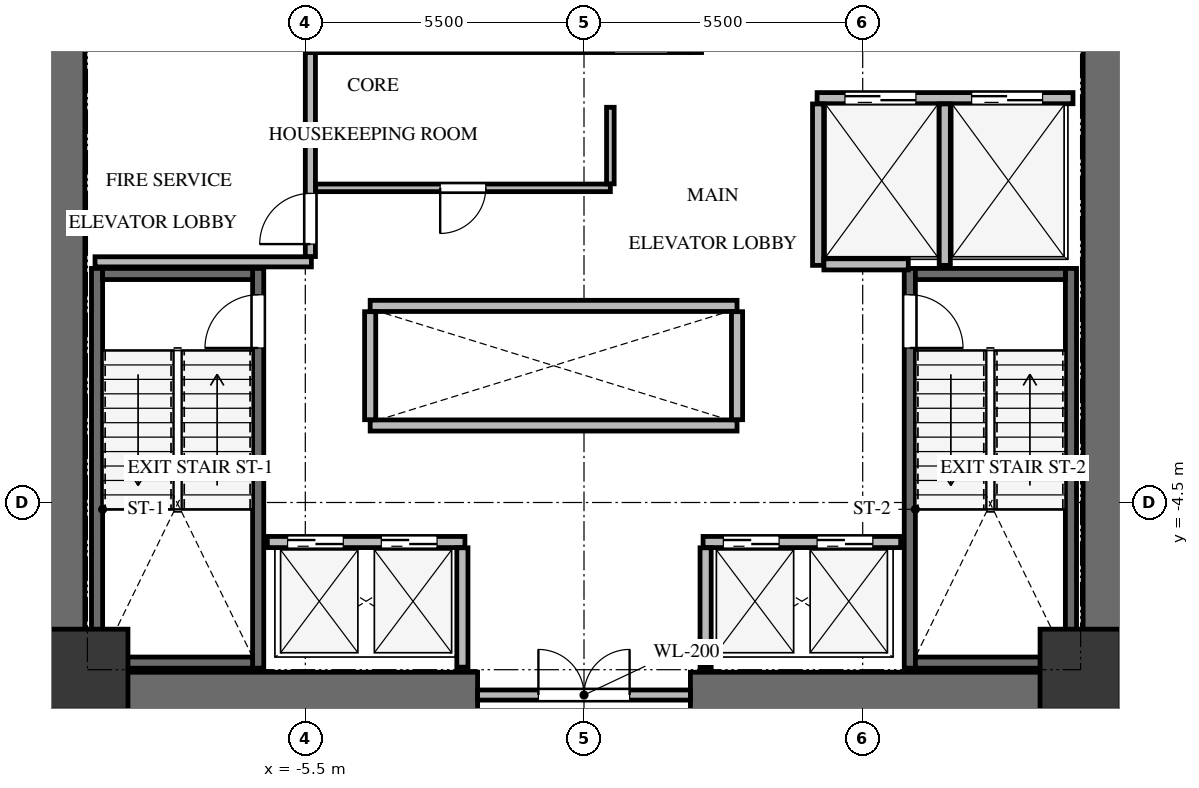
"""IFC4 building model, lengths in metres.
Left out: names, types, materials, properties, quantities, classifications, styles, units other than length and angle.
Written with IfcOpenShell. Run it as: python <this file> out.ifc"""

import sys

from ifc_helpers import new_model, si_unit, direction, frame, frame_2d, origin, origin_2d, place, context, subcontext, project, spatial, rectangle, extrude, source, transform, mapped, element, fill, save


model = new_model("IFC4")
c1 = context("Model", 3, precision=1e-05, world=origin(), true_north=direction((0.0, 1.0)))
c2 = subcontext(c1, "Body", "Model", "MODEL_VIEW")
j1 = project(units=[si_unit("LENGTHUNIT", "METRE"), si_unit("PLANEANGLEUNIT", "RADIAN")], contexts=[c1])
p1 = place(None, origin())
s1 = spatial("IfcSite", under=j1, at=p1, CompositionType="ELEMENT")
p2 = place(p1, origin())
s2 = spatial("IfcBuilding", under=s1, at=p2, CompositionType="ELEMENT")
p3 = place(p2, frame((0.0, 0.0, 84.3)))
s3 = spatial("IfcBuildingStorey", under=s2, at=p3, CompositionType="ELEMENT", Elevation=84.3)
for number, where, z_axis, x_axis in (
    (1, (-10.3, -8.75, 0.0), (0.0, 0.0, 1.0), (0.0, 1.0, 0.0)),
    (2, (10.3, -8.75, 0.0), (0.0, 0.0, 1.0), (0.0, 1.0, 0.0)),
):
    element("IfcWall", number, at=place(p3, frame(where, z_axis=z_axis, x_axis=x_axis)), inside=s3, PredefinedType="SHEAR", context=c2, shape_type="SweptSolid", body=[
        extrude(rectangle(XDim=17.5, YDim=0.9, at=frame_2d((8.75, 0.0))), origin(), (0.0, 0.0, 1.0), 4.2),
    ])
for number, where, z_axis, x_axis in (
    (3, (-9.85, -8.3, 0.0), (0.0, 0.0, 1.0), (1.0, 0.0, 0.0)),
    (4, (2.1, -8.3, 0.0), (0.0, 0.0, 1.0), (1.0, 0.0, 0.0)),
):
    element("IfcWall", number, at=place(p3, frame(where, z_axis=z_axis, x_axis=x_axis)), inside=s3, PredefinedType="SHEAR", context=c2, shape_type="SweptSolid", body=[
        extrude(rectangle(XDim=7.75, YDim=0.9, at=frame_2d((3.875, 0.0))), origin(), (0.0, 0.0, 1.0), 4.2),
    ])
p4 = place(p3, frame((-6.43, -7.77, -0.24), z_axis=(0.0, 0.0, 1.0), x_axis=(0.0, 1.0, 0.0)))
e5 = element("IfcWall", 5, at=p4, inside=s3, PredefinedType="SHEAR", context=c2, shape_type="SweptSolid", body=[
    extrude(rectangle(XDim=7.89, YDim=0.22, at=frame_2d((3.945, 0.0))), origin(), (0.0, 0.0, 1.0), 4.14),
])
p5 = place(p4, frame((6.32, 0.0, 0.0)))
e6 = element("IfcOpeningElement", 6, at=p5, cuts=e5, PredefinedType="OPENING", context=c2, shape_type="SweptSolid", body=[
    extrude(rectangle(XDim=1.05, YDim=2.15, at=frame_2d((0.525, 1.075))), frame((0.0, 0.12, 0.0), z_axis=(0.0, -1.0, 0.0), x_axis=(1.0, 0.0, 0.0)), (0.0, 0.0, 1.0), 0.24),
])
p6 = place(p3, frame((-9.61, 0.12, -0.24), z_axis=(0.0, 0.0, 1.0), x_axis=(0.0, -1.0, 0.0)))
e7 = element("IfcWall", 7, at=p6, inside=s3, PredefinedType="SHEAR", context=c2, shape_type="SweptSolid", body=[
    extrude(rectangle(XDim=7.89, YDim=0.22, at=frame_2d((3.945, 0.0))), origin(), (0.0, 0.0, 1.0), 4.14),
])
for number, where, z_axis, x_axis in (
    (8, (-9.5, -7.66, -0.24), (0.0, 0.0, 1.0), (1.0, 0.0, 0.0)),
    (9, (-6.54, 0.01, -0.24), (0.0, 0.0, 1.0), (-1.0, 0.0, 0.0)),
):
    element("IfcWall", number, at=place(p3, frame(where, z_axis=z_axis, x_axis=x_axis)), inside=s3, PredefinedType="SHEAR", context=c2, shape_type="SweptSolid", body=[
        extrude(rectangle(XDim=2.96, YDim=0.22, at=frame_2d((1.48, 0.0))), origin(), (0.0, 0.0, 1.0), 4.14),
    ])
p7 = place(p3, frame((9.61, -7.77, -0.24), z_axis=(0.0, 0.0, 1.0), x_axis=(0.0, 1.0, 0.0)))
e10 = element("IfcWall", 10, at=p7, inside=s3, PredefinedType="SHEAR", context=c2, shape_type="SweptSolid", body=[
    extrude(rectangle(XDim=7.89, YDim=0.22, at=frame_2d((3.945, 0.0))), origin(), (0.0, 0.0, 1.0), 4.14),
])
p8 = place(p3, frame((6.43, 0.12, -0.24), z_axis=(0.0, 0.0, 1.0), x_axis=(0.0, -1.0, 0.0)))
e11 = element("IfcWall", 11, at=p8, inside=s3, PredefinedType="SHEAR", context=c2, shape_type="SweptSolid", body=[
    extrude(rectangle(XDim=7.89, YDim=0.22, at=frame_2d((3.945, 0.0))), origin(), (0.0, 0.0, 1.0), 4.14),
])
p9 = place(p8, frame((0.52, 0.0, 0.0)))
e12 = element("IfcOpeningElement", 12, at=p9, cuts=e11, PredefinedType="OPENING", context=c2, shape_type="SweptSolid", body=[
    extrude(rectangle(XDim=1.05, YDim=2.15, at=frame_2d((0.525, 1.075))), frame((0.0, 0.12, 0.0), z_axis=(0.0, -1.0, 0.0), x_axis=(1.0, 0.0, 0.0)), (0.0, 0.0, 1.0), 0.24),
])
for number, where, z_axis, x_axis in (
    (13, (6.54, -7.66, -0.24), (0.0, 0.0, 1.0), (1.0, 0.0, 0.0)),
    (14, (9.5, 0.01, -0.24), (0.0, 0.0, 1.0), (-1.0, 0.0, 0.0)),
):
    element("IfcWall", number, at=place(p3, frame(where, z_axis=z_axis, x_axis=x_axis)), inside=s3, PredefinedType="SHEAR", context=c2, shape_type="SweptSolid", body=[
        extrude(rectangle(XDim=2.96, YDim=0.22, at=frame_2d((1.48, 0.0))), origin(), (0.0, 0.0, 1.0), 4.14),
    ])
for number, where, z_axis, x_axis in (
    (15, (2.21, 4.38, -0.24), (0.0, 0.0, 1.0), (0.0, 1.0, 0.0)),
    (16, (-5.36, 7.78, -0.24), (0.0, 0.0, 1.0), (0.0, -1.0, 0.0)),
):
    element("IfcWall", number, at=place(p3, frame(where, z_axis=z_axis, x_axis=x_axis)), inside=s3, PredefinedType="SHEAR", context=c2, shape_type="SweptSolid", body=[
        extrude(rectangle(XDim=3.4, YDim=0.22, at=frame_2d((1.7, 0.0))), origin(), (0.0, 0.0, 1.0), 4.14),
    ])
p10 = place(p3, frame((-5.25, 4.49, -0.24), z_axis=(0.0, 0.0, 1.0), x_axis=(1.0, 0.0, 0.0)))
e17 = element("IfcWall", 17, at=p10, inside=s3, PredefinedType="SHEAR", context=c2, shape_type="SweptSolid", body=[
    extrude(rectangle(XDim=7.35, YDim=0.22, at=frame_2d((3.675, 0.0))), origin(), (0.0, 0.0, 1.0), 4.14),
])
p11 = place(p10, frame((5.85, 0.0, 0.0)))
e18 = element("IfcOpeningElement", 18, at=p11, cuts=e17, PredefinedType="OPENING", context=c2, shape_type="SweptSolid", body=[
    extrude(rectangle(XDim=1.05, YDim=2.15, at=frame_2d((0.525, 1.075))), frame((0.0, 0.12, 0.0), z_axis=(0.0, -1.0, 0.0), x_axis=(1.0, 0.0, 0.0)), (0.0, 0.0, 1.0), 0.24),
])
m1 = source(origin(), c2, "Body", "SweptSolid", [
    extrude(rectangle(XDim=1.6, YDim=1.6, at=origin_2d()), origin(), (0.0, 0.0, 1.0), 4.14),
])
for number, where, z_axis, x_axis in (
    (19, (-9.8, -7.8, -0.24), (0.0, 0.0, 1.0), (1.0, 0.0, 0.0)),
    (20, (9.8, -7.8, -0.24), (0.0, 0.0, 1.0), (1.0, 0.0, 0.0)),
):
    element("IfcColumn", number, at=place(p3, frame(where, z_axis=z_axis, x_axis=x_axis)), inside=s3, PredefinedType="COLUMN", context=c2, shape_type="MappedRepresentation", body=[
        mapped(m1, transform((0.0, 0.0, 0.0), x_axis=(1.0, 0.0, 0.0), y_axis=(0.0, 1.0, 0.0), z_axis=(0.0, 0.0, 1.0), scale=1.0)),
    ])
p12 = place(p3, frame((-2.1, -8.3, 0.0), z_axis=(0.0, 0.0, 1.0), x_axis=(1.0, 0.0, 0.0)))
e21 = element("IfcWall", 21, at=p12, inside=s3, PredefinedType="SOLIDWALL", context=c2, shape_type="SweptSolid", body=[
    extrude(rectangle(XDim=4.2, YDim=0.2, at=frame_2d((2.1, 0.0))), origin(), (0.0, 0.0, 1.0), 3.885),
])
p13 = place(p12, frame((1.2, 0.0, 0.0)))
e22 = element("IfcOpeningElement", 22, at=p13, cuts=e21, PredefinedType="OPENING", context=c2, shape_type="SweptSolid", body=[
    extrude(rectangle(XDim=1.8, YDim=2.15, at=frame_2d((0.9, 1.075))), frame((0.0, 0.11, 0.0), z_axis=(0.0, -1.0, 0.0), x_axis=(1.0, 0.0, 0.0)), (0.0, 0.0, 1.0), 0.22),
])
p14 = place(p3, frame((-9.65, 0.25, 0.0), z_axis=(0.0, 0.0, 1.0), x_axis=(1.0, 0.0, 0.0)))
e23 = element("IfcWall", 23, at=p14, inside=s3, PredefinedType="SOLIDWALL", context=c2, shape_type="SweptSolid", body=[
    extrude(rectangle(XDim=4.27, YDim=0.2, at=frame_2d((2.135, 0.0))), origin(), (0.0, 0.0, 1.0), 3.885),
])
p15 = place(p3, frame((-5.4, 0.354, 0.0), z_axis=(0.0, 0.0, 1.0), x_axis=(0.0, 1.0, 0.0)))
e24 = element("IfcWall", 24, at=p15, inside=s3, PredefinedType="SOLIDWALL", context=c2, shape_type="SweptSolid", body=[
    extrude(rectangle(XDim=4.026, YDim=0.2, at=frame_2d((2.013, 0.0))), origin(), (0.0, 0.0, 1.0), 3.885),
])
p16 = place(p15, frame((0.246, 0.0, 0.0)))
e25 = element("IfcOpeningElement", 25, at=p16, cuts=e24, PredefinedType="OPENING", context=c2, shape_type="SweptSolid", body=[
    extrude(rectangle(XDim=1.0, YDim=2.15, at=frame_2d((0.5, 1.075))), frame((0.0, 0.11, 0.0), z_axis=(0.0, -1.0, 0.0), x_axis=(1.0, 0.0, 0.0)), (0.0, 0.0, 1.0), 0.22),
])
p17 = place(p3, frame((4.6, 3.48, 0.0), z_axis=(0.0, 0.0, 1.0), x_axis=(1.0, 0.0, 0.0)))
e26 = element("IfcWall", 26, at=p17, inside=s3, PredefinedType="SOLIDWALL", context=c2, shape_type="SweptSolid", body=[
    extrude(rectangle(XDim=5.05, YDim=0.22, at=frame_2d((2.525, 0.0))), origin(), (0.0, 0.0, 1.0), 3.885),
])
p18 = place(p17, frame((0.55, 0.0, 0.0)))
e27 = element("IfcOpeningElement", 27, at=p18, cuts=e26, PredefinedType="OPENING", context=c2, shape_type="SweptSolid", body=[
    extrude(rectangle(XDim=1.4, YDim=2.15, at=frame_2d((0.7, 1.075))), frame((0.0, 0.12, 0.0), z_axis=(0.0, -1.0, 0.0), x_axis=(1.0, 0.0, 0.0)), (0.0, 0.0, 1.0), 0.24),
])
p19 = place(p17, frame((3.05, 0.0, 0.0)))
e28 = element("IfcOpeningElement", 28, at=p19, cuts=e26, PredefinedType="OPENING", context=c2, shape_type="SweptSolid", body=[
    extrude(rectangle(XDim=1.4, YDim=2.15, at=frame_2d((0.7, 1.075))), frame((0.0, 0.12, 0.0), z_axis=(0.0, -1.0, 0.0), x_axis=(1.0, 0.0, 0.0)), (0.0, 0.0, 1.0), 0.24),
])
for number, where, z_axis, x_axis in (
    (29, (4.62, 0.18, 0.0), (0.0, 0.0, 1.0), (0.0, 1.0, 0.0)),
    (30, (7.12, 0.18, 0.0), (0.0, 0.0, 1.0), (0.0, 1.0, 0.0)),
):
    element("IfcWall", number, at=place(p3, frame(where, z_axis=z_axis, x_axis=x_axis)), inside=s3, PredefinedType="SOLIDWALL", context=c2, shape_type="SweptSolid", body=[
        extrude(rectangle(XDim=3.186, YDim=0.22, at=frame_2d((1.593, 0.0))), origin(), (0.0, 0.0, 1.0), 3.885),
    ])
p20 = place(p3, frame((4.734, 0.2, 0.0), z_axis=(0.0, 0.0, 1.0), x_axis=(1.0, 0.0, 0.0)))
e31 = element("IfcWall", 31, at=p20, inside=s3, PredefinedType="SOLIDWALL", context=c2, shape_type="SweptSolid", body=[
    extrude(rectangle(XDim=1.666, YDim=0.22, at=frame_2d((0.833, 0.0))), origin(), (0.0, 0.0, 1.0), 3.885),
])
p21 = place(p3, frame((-6.25, -5.28, 0.0), z_axis=(0.0, 0.0, 1.0), x_axis=(1.0, 0.0, 0.0)))
e32 = element("IfcWall", 32, at=p21, inside=s3, PredefinedType="SOLIDWALL", context=c2, shape_type="SweptSolid", body=[
    extrude(rectangle(XDim=3.9, YDim=0.22, at=frame_2d((1.95, 0.0))), origin(), (0.0, 0.0, 1.0), 3.885),
])
p22 = place(p21, frame((0.4, 0.0, 0.0)))
e33 = element("IfcOpeningElement", 33, at=p22, cuts=e32, PredefinedType="OPENING", context=c2, shape_type="SweptSolid", body=[
    extrude(rectangle(XDim=1.1, YDim=2.15, at=frame_2d((0.55, 1.075))), frame((0.0, 0.12, 0.0), z_axis=(0.0, -1.0, 0.0), x_axis=(1.0, 0.0, 0.0)), (0.0, 0.0, 1.0), 0.24),
])
p23 = place(p21, frame((2.25, 0.0, 0.0)))
e34 = element("IfcOpeningElement", 34, at=p23, cuts=e32, PredefinedType="OPENING", context=c2, shape_type="SweptSolid", body=[
    extrude(rectangle(XDim=1.1, YDim=2.15, at=frame_2d((0.55, 1.075))), frame((0.0, 0.12, 0.0), z_axis=(0.0, -1.0, 0.0), x_axis=(1.0, 0.0, 0.0)), (0.0, 0.0, 1.0), 0.24),
])
p24 = place(p3, frame((2.35, -5.28, 0.0), z_axis=(0.0, 0.0, 1.0), x_axis=(1.0, 0.0, 0.0)))
e35 = element("IfcWall", 35, at=p24, inside=s3, PredefinedType="SOLIDWALL", context=c2, shape_type="SweptSolid", body=[
    extrude(rectangle(XDim=3.9, YDim=0.22, at=frame_2d((1.95, 0.0))), origin(), (0.0, 0.0, 1.0), 3.885),
])
p25 = place(p24, frame((0.4, 0.0, 0.0)))
e36 = element("IfcOpeningElement", 36, at=p25, cuts=e35, PredefinedType="OPENING", context=c2, shape_type="SweptSolid", body=[
    extrude(rectangle(XDim=1.1, YDim=2.15, at=frame_2d((0.55, 1.075))), frame((0.0, 0.12, 0.0), z_axis=(0.0, -1.0, 0.0), x_axis=(1.0, 0.0, 0.0)), (0.0, 0.0, 1.0), 0.24),
])
p26 = place(p24, frame((2.25, 0.0, 0.0)))
e37 = element("IfcOpeningElement", 37, at=p26, cuts=e35, PredefinedType="OPENING", context=c2, shape_type="SweptSolid", body=[
    extrude(rectangle(XDim=1.1, YDim=2.15, at=frame_2d((0.55, 1.075))), frame((0.0, 0.12, 0.0), z_axis=(0.0, -1.0, 0.0), x_axis=(1.0, 0.0, 0.0)), (0.0, 0.0, 1.0), 0.24),
])
for number, where, z_axis, x_axis in (
    (38, (-2.4, -7.75, 0.0), (0.0, 0.0, 1.0), (0.0, 1.0, 0.0)),
    (39, (2.4, -7.75, 0.0), (0.0, 0.0, 1.0), (0.0, 1.0, 0.0)),
):
    element("IfcWall", number, at=place(p3, frame(where, z_axis=z_axis, x_axis=x_axis)), inside=s3, PredefinedType="SOLIDWALL", context=c2, shape_type="SweptSolid", body=[
        extrude(rectangle(XDim=2.356, YDim=0.22, at=frame_2d((1.178, 0.0))), origin(), (0.0, 0.0, 1.0), 3.885),
    ])
for number, where, z_axis, x_axis in (
    (40, (-4.22, -2.98, 0.0), (0.0, 0.0, 1.0), (1.0, 0.0, 0.0)),
    (41, (-4.22, -0.62, 0.0), (0.0, 0.0, 1.0), (1.0, 0.0, 0.0)),
):
    element("IfcWall", number, at=place(p3, frame(where, z_axis=z_axis, x_axis=x_axis)), inside=s3, PredefinedType="SOLIDWALL", context=c2, shape_type="SweptSolid", body=[
        extrude(rectangle(XDim=7.24, YDim=0.22, at=frame_2d((3.62, 0.0))), origin(), (0.0, 0.0, 1.0), 3.885),
    ])
for number, where, z_axis, x_axis in (
    (42, (-4.22, -2.866, 0.0), (0.0, 0.0, 1.0), (0.0, 1.0, 0.0)),
    (43, (3.02, -2.866, 0.0), (0.0, 0.0, 1.0), (0.0, 1.0, 0.0)),
):
    element("IfcWall", number, at=place(p3, frame(where, z_axis=z_axis, x_axis=x_axis)), inside=s3, PredefinedType="SOLIDWALL", context=c2, shape_type="SweptSolid", body=[
        extrude(rectangle(XDim=2.132, YDim=0.22, at=frame_2d((1.066, 0.0))), origin(), (0.0, 0.0, 1.0), 3.885),
    ])
p27 = place(p3, frame((0.52, 1.71, 0.0), z_axis=(0.0, 0.0, 1.0), x_axis=(-1.0, 0.0, 0.0)))
e44 = element("IfcWall", 44, at=p27, inside=s3, PredefinedType="PARTITIONING", context=c2, shape_type="SweptSolid", body=[
    extrude(rectangle(XDim=5.816, YDim=0.15, at=frame_2d((2.908, 0.0))), origin(), (0.0, 0.0, 1.0), 3.885),
])
p28 = place(p27, frame((2.458, 0.0, 0.0)))
e45 = element("IfcOpeningElement", 45, at=p28, cuts=e44, PredefinedType="OPENING", context=c2, shape_type="SweptSolid", body=[
    extrude(rectangle(XDim=0.9, YDim=2.05, at=frame_2d((0.45, 1.025))), frame((0.0, 0.085, 0.0), z_axis=(0.0, -1.0, 0.0), x_axis=(1.0, 0.0, 0.0)), (0.0, 0.0, 1.0), 0.17),
])
p29 = place(p3, frame((0.52, 3.3, 0.0), z_axis=(0.0, 0.0, 1.0), x_axis=(0.0, -1.0, 0.0)))
e46 = element("IfcWall", 46, at=p29, inside=s3, PredefinedType="PARTITIONING", context=c2, shape_type="SweptSolid", body=[
    extrude(rectangle(XDim=1.511, YDim=0.15, at=frame_2d((0.755, 0.0))), origin(), (0.0, 0.0, 1.0), 3.885),
])
m2 = source(origin(), c2, "Body", "SweptSolid", [
    extrude(rectangle(XDim=1.05, YDim=2.15, at=frame_2d((0.525, 1.075))), frame((0.0, 0.025, 0.0), z_axis=(0.0, -1.0, 0.0), x_axis=(1.0, 0.0, 0.0)), (0.0, 0.0, 1.0), 0.05),
])
p30 = place(p5, origin())
e47 = element("IfcDoor", 47, at=p30, inside=s3, OperationType="SINGLE_SWING_LEFT", PredefinedType="DOOR", context=c2, shape_type="MappedRepresentation", body=[
    mapped(m2, transform((0.0, 0.0, 0.0), x_axis=(1.0, 0.0, 0.0), y_axis=(0.0, 1.0, 0.0), z_axis=(0.0, 0.0, 1.0), scale=1.0)),
])
fill(e6, e47)
m3 = source(origin(), c2, "Body", "SweptSolid", [
    extrude(rectangle(XDim=1.05, YDim=2.15, at=frame_2d((0.525, 1.075))), frame((0.0, 0.025, 0.0), z_axis=(0.0, -1.0, 0.0), x_axis=(1.0, 0.0, 0.0)), (0.0, 0.0, 1.0), 0.05),
])
p31 = place(p9, origin())
e48 = element("IfcDoor", 48, at=p31, inside=s3, OperationType="SINGLE_SWING_RIGHT", PredefinedType="DOOR", context=c2, shape_type="MappedRepresentation", body=[
    mapped(m3, transform((0.0, 0.0, 0.0), x_axis=(1.0, 0.0, 0.0), y_axis=(0.0, 1.0, 0.0), z_axis=(0.0, 0.0, 1.0), scale=1.0)),
])
fill(e12, e48)
m4 = source(origin(), c2, "Body", "SweptSolid", [
    extrude(rectangle(XDim=1.8, YDim=2.15, at=frame_2d((0.9, 1.075))), frame((0.0, 0.025, 0.0), z_axis=(0.0, -1.0, 0.0), x_axis=(1.0, 0.0, 0.0)), (0.0, 0.0, 1.0), 0.05),
])
p32 = place(p13, origin())
e49 = element("IfcDoor", 49, at=p32, inside=s3, OperationType="DOUBLE_DOOR_SINGLE_SWING", PredefinedType="DOOR", context=c2, shape_type="MappedRepresentation", body=[
    mapped(m4, transform((0.0, 0.0, 0.0), x_axis=(1.0, 0.0, 0.0), y_axis=(0.0, 1.0, 0.0), z_axis=(0.0, 0.0, 1.0), scale=1.0)),
])
fill(e22, e49)
m5 = source(origin(), c2, "Body", "SweptSolid", [
    extrude(rectangle(XDim=1.0, YDim=2.15, at=frame_2d((0.5, 1.075))), frame((0.0, 0.025, 0.0), z_axis=(0.0, -1.0, 0.0), x_axis=(1.0, 0.0, 0.0)), (0.0, 0.0, 1.0), 0.05),
])
p33 = place(p16, origin())
e50 = element("IfcDoor", 50, at=p33, inside=s3, OperationType="SINGLE_SWING_LEFT", PredefinedType="DOOR", context=c2, shape_type="MappedRepresentation", body=[
    mapped(m5, transform((0.0, 0.0, 0.0), x_axis=(1.0, 0.0, 0.0), y_axis=(0.0, 1.0, 0.0), z_axis=(0.0, 0.0, 1.0), scale=1.0)),
])
fill(e25, e50)
m6 = source(origin(), c2, "Body", "SweptSolid", [
    extrude(rectangle(XDim=1.4, YDim=2.15, at=frame_2d((0.7, 1.075))), frame((0.0, 0.025, 0.0), z_axis=(0.0, -1.0, 0.0), x_axis=(1.0, 0.0, 0.0)), (0.0, 0.0, 1.0), 0.05),
])
p34 = place(p18, origin())
e51 = element("IfcDoor", 51, at=p34, inside=s3, OperationType="DOUBLE_DOOR_SLIDING", PredefinedType="DOOR", context=c2, shape_type="MappedRepresentation", body=[
    mapped(m6, transform((0.0, 0.0, 0.0), x_axis=(1.0, 0.0, 0.0), y_axis=(0.0, 1.0, 0.0), z_axis=(0.0, 0.0, 1.0), scale=1.0)),
])
fill(e27, e51)
p35 = place(p19, origin())
e52 = element("IfcDoor", 52, at=p35, inside=s3, OperationType="DOUBLE_DOOR_SLIDING", PredefinedType="DOOR", context=c2, shape_type="MappedRepresentation", body=[
    mapped(m6, transform((0.0, 0.0, 0.0), x_axis=(1.0, 0.0, 0.0), y_axis=(0.0, 1.0, 0.0), z_axis=(0.0, 0.0, 1.0), scale=1.0)),
])
fill(e28, e52)
m7 = source(origin(), c2, "Body", "SweptSolid", [
    extrude(rectangle(XDim=1.1, YDim=2.15, at=frame_2d((0.55, 1.075))), frame((0.0, 0.025, 0.0), z_axis=(0.0, -1.0, 0.0), x_axis=(1.0, 0.0, 0.0)), (0.0, 0.0, 1.0), 0.05),
])
p36 = place(p22, origin())
e53 = element("IfcDoor", 53, at=p36, inside=s3, OperationType="DOUBLE_DOOR_SLIDING", PredefinedType="DOOR", context=c2, shape_type="MappedRepresentation", body=[
    mapped(m7, transform((0.0, 0.0, 0.0), x_axis=(1.0, 0.0, 0.0), y_axis=(0.0, 1.0, 0.0), z_axis=(0.0, 0.0, 1.0), scale=1.0)),
])
fill(e33, e53)
p37 = place(p23, origin())
e54 = element("IfcDoor", 54, at=p37, inside=s3, OperationType="DOUBLE_DOOR_SLIDING", PredefinedType="DOOR", context=c2, shape_type="MappedRepresentation", body=[
    mapped(m7, transform((0.0, 0.0, 0.0), x_axis=(1.0, 0.0, 0.0), y_axis=(0.0, 1.0, 0.0), z_axis=(0.0, 0.0, 1.0), scale=1.0)),
])
fill(e34, e54)
p38 = place(p25, origin())
e55 = element("IfcDoor", 55, at=p38, inside=s3, OperationType="DOUBLE_DOOR_SLIDING", PredefinedType="DOOR", context=c2, shape_type="MappedRepresentation", body=[
    mapped(m7, transform((0.0, 0.0, 0.0), x_axis=(1.0, 0.0, 0.0), y_axis=(0.0, 1.0, 0.0), z_axis=(0.0, 0.0, 1.0), scale=1.0)),
])
fill(e36, e55)
p39 = place(p26, origin())
e56 = element("IfcDoor", 56, at=p39, inside=s3, OperationType="DOUBLE_DOOR_SLIDING", PredefinedType="DOOR", context=c2, shape_type="MappedRepresentation", body=[
    mapped(m7, transform((0.0, 0.0, 0.0), x_axis=(1.0, 0.0, 0.0), y_axis=(0.0, 1.0, 0.0), z_axis=(0.0, 0.0, 1.0), scale=1.0)),
])
fill(e37, e56)
m8 = source(origin(), c2, "Body", "SweptSolid", [
    extrude(rectangle(XDim=0.9, YDim=2.05, at=frame_2d((0.45, 1.025))), frame((0.0, 0.025, 0.0), z_axis=(0.0, -1.0, 0.0), x_axis=(1.0, 0.0, 0.0)), (0.0, 0.0, 1.0), 0.05),
])
p40 = place(p28, origin())
e57 = element("IfcDoor", 57, at=p40, inside=s3, OperationType="SINGLE_SWING_RIGHT", PredefinedType="DOOR", context=c2, shape_type="MappedRepresentation", body=[
    mapped(m8, transform((0.0, 0.0, 0.0), x_axis=(1.0, 0.0, 0.0), y_axis=(0.0, 1.0, 0.0), z_axis=(0.0, 0.0, 1.0), scale=1.0)),
])
fill(e45, e57)
save(model, sys.argv[1])
